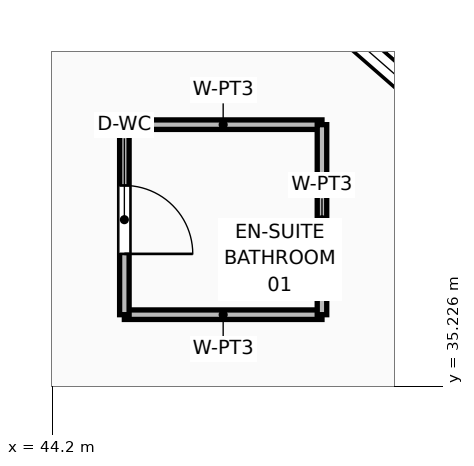
"""IFC4 building model, lengths in metres.
Left out: names, types, materials, properties, quantities, classifications, styles, units other than length and angle.
Written with IfcOpenShell. Run it as: python <this file> out.ifc"""

import sys

from ifc_helpers import new_model, si_unit, direction, frame, frame_2d, origin, place, context, subcontext, project, spatial, rectangle, extrude, element, fill, save


model = new_model("IFC4")
c1 = context("Model", 3, precision=1e-05, world=origin(), true_north=direction((0.0, 1.0)))
c2 = subcontext(c1, "Body", "Model", "MODEL_VIEW")
j1 = project(units=[si_unit("LENGTHUNIT", "METRE"), si_unit("PLANEANGLEUNIT", "RADIAN")], contexts=[c1])
p1 = place(None, origin())
s1 = spatial("IfcSite", under=j1, at=p1, CompositionType="ELEMENT")
p2 = place(p1, origin())
s2 = spatial("IfcBuilding", under=s1, at=p2, CompositionType="ELEMENT")
p3 = place(p2, frame((0.0, 0.0, 75.75)))
s3 = spatial("IfcBuildingStorey", under=s2, at=p3, CompositionType="ELEMENT", Elevation=75.75)
p4 = place(p3, frame((49.778, 38.395, 0.0), z_axis=(0.0, 0.0, 1.0), x_axis=(-0.753137964346, 0.657862604699, 0.0)))
e1 = element("IfcWall", 1, at=p4, inside=s3, PredefinedType="SOLIDWALL", context=c2, shape_type="SweptSolid", body=[
    extrude(rectangle(XDim=3.905, YDim=0.24, at=frame_2d((1.953, 0.0))), origin(), (0.0, 0.0, 1.0), 3.57),
])
p5 = place(p4, frame((0.953, 0.0, 0.85)))
e2 = element("IfcOpeningElement", 2, at=p5, cuts=e1, PredefinedType="OPENING", context=c2, shape_type="SweptSolid", body=[
    extrude(rectangle(XDim=2.0, YDim=2.4, at=frame_2d((1.0, 1.2))), frame((0.0, 0.13, 0.0), z_axis=(0.0, -1.0, 0.0), x_axis=(1.0, 0.0, 0.0)), (0.0, 0.0, 1.0), 0.26),
])
p6 = place(p3, frame((45.149, 36.167, 0.0), z_axis=(0.0, 0.0, 1.0), x_axis=(1.0, 0.0, 0.0)))
e3 = element("IfcWall", 3, at=p6, inside=s3, PredefinedType="PARTITIONING", context=c2, shape_type="SweptSolid", body=[
    extrude(rectangle(XDim=2.6, YDim=0.125, at=frame_2d((1.3, 0.0))), origin(), (0.0, 0.0, 1.0), 3.55),
])
p7 = place(p3, frame((45.149, 38.667, 0.0), z_axis=(0.0, 0.0, 1.0), x_axis=(1.0, 0.0, 0.0)))
e4 = element("IfcWall", 4, at=p7, inside=s3, PredefinedType="PARTITIONING", context=c2, shape_type="SweptSolid", body=[
    extrude(rectangle(XDim=2.6, YDim=0.125, at=frame_2d((1.3, 0.0))), origin(), (0.0, 0.0, 1.0), 3.145),
])
p8 = place(p3, frame((45.149, 36.167, 0.0), z_axis=(0.0, 0.0, 1.0), x_axis=(0.0, 1.0, 0.0)))
e5 = element("IfcWall", 5, at=p8, inside=s3, PredefinedType="PARTITIONING", context=c2, shape_type="SweptSolid", body=[
    extrude(rectangle(XDim=2.5, YDim=0.125, at=frame_2d((1.25, 0.0))), origin(), (0.0, 0.0, 1.0), 3.55),
])
p9 = place(p8, frame((0.8, 0.0, 0.0)))
e6 = element("IfcOpeningElement", 6, at=p9, cuts=e5, PredefinedType="OPENING", context=c2, shape_type="SweptSolid", body=[
    extrude(rectangle(XDim=0.9, YDim=2.1, at=frame_2d((0.45, 1.05))), frame((0.0, 0.073, 0.0), z_axis=(0.0, -1.0, 0.0), x_axis=(1.0, 0.0, 0.0)), (0.0, 0.0, 1.0), 0.145),
])
p10 = place(p3, frame((47.749, 36.167, 0.0), z_axis=(0.0, 0.0, 1.0), x_axis=(0.0, 1.0, 0.0)))
e7 = element("IfcWall", 7, at=p10, inside=s3, PredefinedType="PARTITIONING", context=c2, shape_type="SweptSolid", body=[
    extrude(rectangle(XDim=2.5, YDim=0.125, at=frame_2d((1.25, 0.0))), origin(), (0.0, 0.0, 1.0), 3.55),
])
p11 = place(p5, origin())
e8 = element("IfcWindow", 8, at=p11, inside=s3, PartitioningType="SINGLE_PANEL", PredefinedType="WINDOW", context=c2, shape_type="SweptSolid", body=[
    extrude(rectangle(XDim=2.0, YDim=2.4, at=frame_2d((1.0, 1.2))), frame((0.0, 0.03, 0.0), z_axis=(0.0, -1.0, 0.0), x_axis=(1.0, 0.0, 0.0)), (0.0, 0.0, 1.0), 0.06),
])
fill(e2, e8)
p12 = place(p9, frame((0.9, 0.0, 0.0), z_axis=(0.0, 0.0, 1.0), x_axis=(-1.0, 0.0, 0.0)))
e9 = element("IfcDoor", 9, at=p12, inside=s3, OperationType="SINGLE_SWING_RIGHT", PredefinedType="DOOR", context=c2, shape_type="SweptSolid", body=[
    extrude(rectangle(XDim=0.9, YDim=2.1, at=frame_2d((0.45, 1.05))), frame((0.0, 0.025, 0.0), z_axis=(0.0, -1.0, 0.0), x_axis=(1.0, 0.0, 0.0)), (0.0, 0.0, 1.0), 0.05),
])
fill(e6, e9)
save(model, sys.argv[1])
